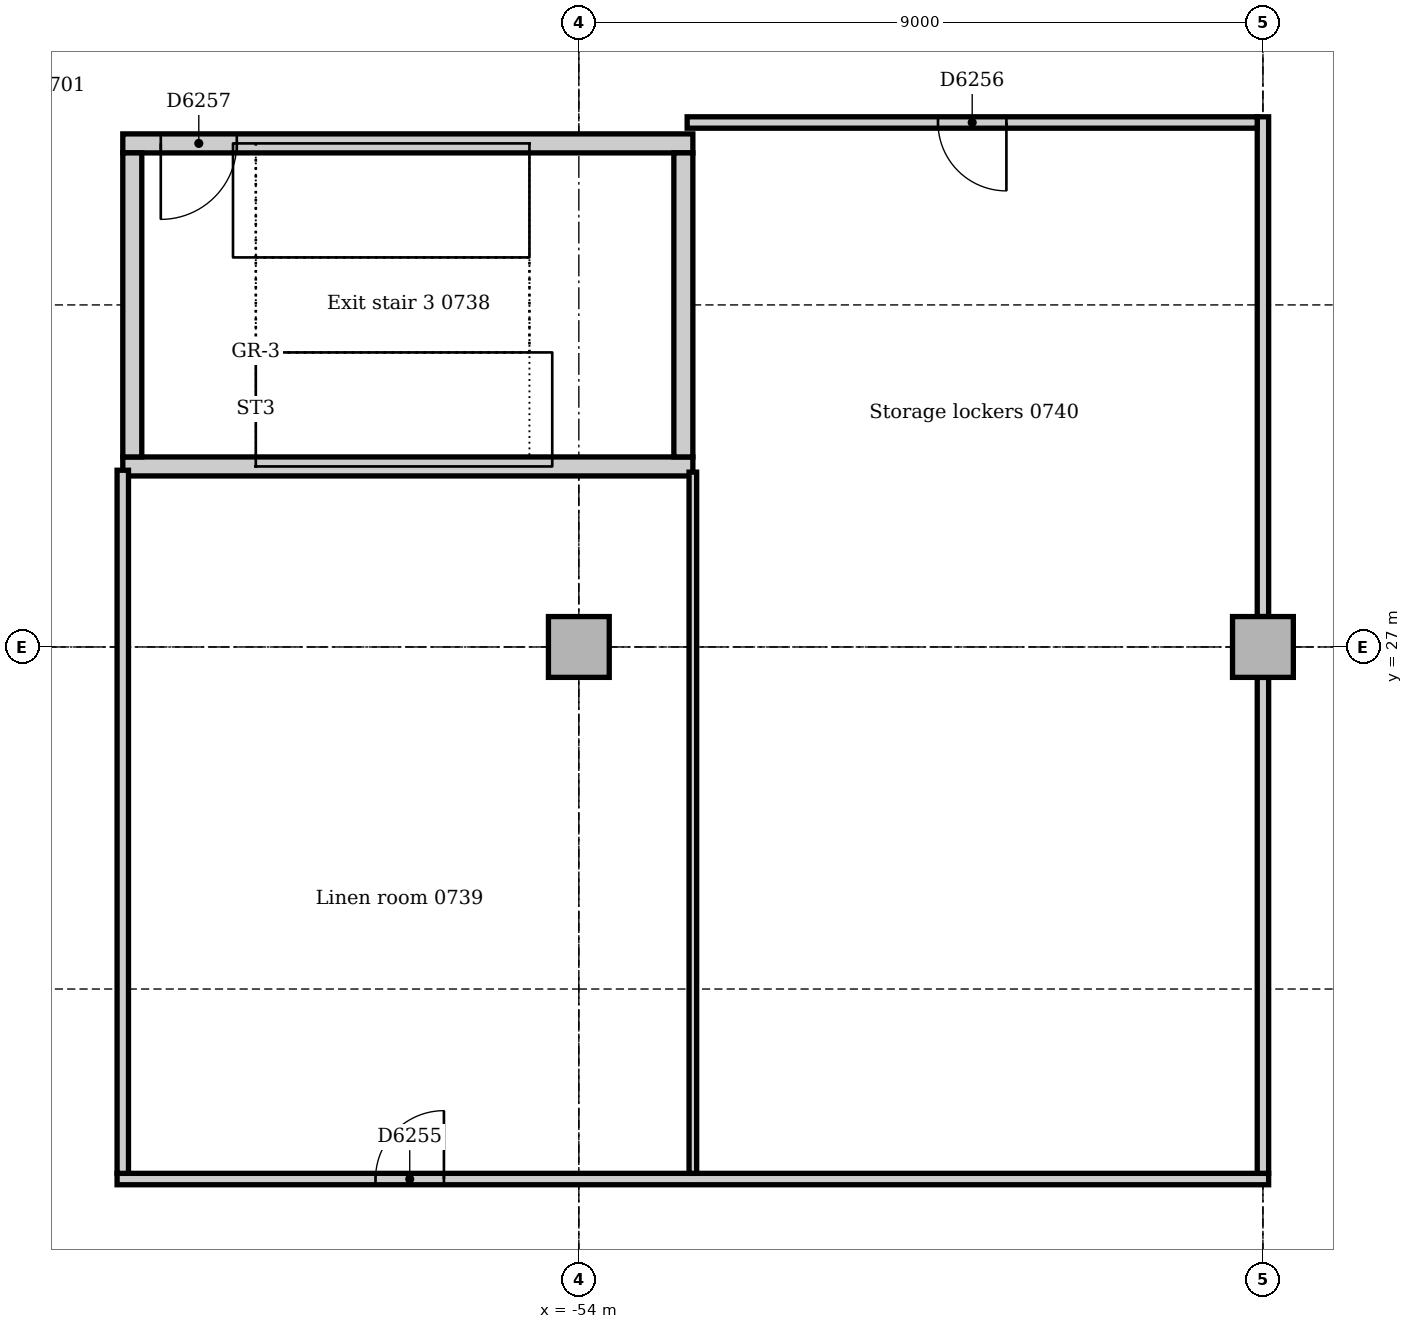
"""IFC4 building model, lengths in metres.
Left out: names, types, materials, properties, quantities, classifications, styles, units other than length and angle.
Written with IfcOpenShell. Run it as: python <this file> out.ifc"""

import sys

from ifc_helpers import new_model, si_unit, direction, frame, frame_2d, origin, origin_2d, place, context, subcontext, project, spatial, rectangle, extrude, element, fill, save


model = new_model("IFC4")
c1 = context("Model", 3, precision=1e-05, world=origin(), true_north=direction((0.0, 1.0)))
c2 = subcontext(c1, "Body", "Model", "MODEL_VIEW")
j1 = project(units=[si_unit("LENGTHUNIT", "METRE"), si_unit("PLANEANGLEUNIT", "RADIAN")], contexts=[c1])
p1 = place(None, origin())
s1 = spatial("IfcSite", under=j1, at=p1, CompositionType="ELEMENT")
p2 = place(p1, origin())
s2 = spatial("IfcBuilding", under=s1, at=p2, CompositionType="ELEMENT")
p3 = place(p2, frame((0.0, 0.0, 34.0)))
s3 = spatial("IfcBuildingStorey", under=s2, at=p3, CompositionType="ELEMENT", Elevation=34.0)
p4 = place(p3, frame((-60.0, 29.375, 0.0), z_axis=(0.0, 0.0, 1.0), x_axis=(1.0, 0.0, 0.0)))
e1 = element("IfcWall", 1, at=p4, inside=s3, PredefinedType="SOLIDWALL", context=c2, shape_type="SweptSolid", body=[
    extrude(rectangle(XDim=7.5, YDim=0.25, at=frame_2d((3.75, 0.0))), origin(), (0.0, 0.0, 1.0), 4.0),
])
p5 = place(p3, frame((-52.5, 33.625, 0.0), z_axis=(0.0, 0.0, 1.0), x_axis=(-1.0, 0.0, 0.0)))
e2 = element("IfcWall", 2, at=p5, inside=s3, PredefinedType="SOLIDWALL", context=c2, shape_type="SweptSolid", body=[
    extrude(rectangle(XDim=7.5, YDim=0.25, at=frame_2d((3.75, 0.0))), origin(), (0.0, 0.0, 1.0), 4.0),
])
p6 = place(p5, frame((6.0, 0.0, 0.0)))
e3 = element("IfcOpeningElement", 3, at=p6, cuts=e2, PredefinedType="OPENING", context=c2, shape_type="SweptSolid", body=[
    extrude(rectangle(XDim=1.0, YDim=2.1, at=frame_2d((0.5, 1.05))), frame((0.0, 0.135, 0.0), z_axis=(0.0, -1.0, 0.0), x_axis=(1.0, 0.0, 0.0)), (0.0, 0.0, 1.0), 0.27),
])
for number, where, z_axis, x_axis in (
    (4, (-52.625, 29.5, 0.0), (0.0, 0.0, 1.0), (0.0, 1.0, 0.0)),
    (5, (-59.875, 33.5, 0.0), (0.0, 0.0, 1.0), (0.0, -1.0, 0.0)),
):
    element("IfcWall", number, at=place(p3, frame(where, z_axis=z_axis, x_axis=x_axis)), inside=s3, PredefinedType="SOLIDWALL", context=c2, shape_type="SweptSolid", body=[
        extrude(rectangle(XDim=4.0, YDim=0.25, at=frame_2d((2.0, 0.0))), origin(), (0.0, 0.0, 1.0), 4.0),
    ])
for number, where, z_axis, x_axis in (
    (6, (-54.0, 27.0, 0.0), (0.0, 0.0, 1.0), (1.0, 0.0, 0.0)),
    (7, (-45.0, 27.0, 0.0), (0.0, 0.0, 1.0), (1.0, 0.0, 0.0)),
):
    element("IfcColumn", number, at=place(p3, frame(where, z_axis=z_axis, x_axis=x_axis)), inside=s3, PredefinedType="COLUMN", context=c2, shape_type="SweptSolid", body=[
        extrude(rectangle(XDim=0.8, YDim=0.8, at=origin_2d()), origin(), (0.0, 0.0, 1.0), 3.85),
    ])
p7 = place(p3, frame((-60.075, 20.0, 0.0), z_axis=(0.0, 0.0, 1.0), x_axis=(1.0, 0.0, 0.0)))
e8 = element("IfcWall", 8, at=p7, inside=s3, PredefinedType="PARTITIONING", context=c2, shape_type="SweptSolid", body=[
    extrude(rectangle(XDim=15.15, YDim=0.15, at=frame_2d((7.575, 0.0))), origin(), (0.0, 0.0, 1.0), 3.85),
])
p8 = place(p7, frame((3.4, 0.0, 0.0)))
e9 = element("IfcOpeningElement", 9, at=p8, cuts=e8, PredefinedType="OPENING", context=c2, shape_type="SweptSolid", body=[
    extrude(rectangle(XDim=0.9, YDim=2.1, at=frame_2d((0.45, 1.05))), frame((0.0, 0.085, 0.0), z_axis=(0.0, -1.0, 0.0), x_axis=(1.0, 0.0, 0.0)), (0.0, 0.0, 1.0), 0.17),
])
p9 = place(p3, frame((-45.0, 20.075, 0.0), z_axis=(0.0, 0.0, 1.0), x_axis=(0.0, 1.0, 0.0)))
e10 = element("IfcWall", 10, at=p9, inside=s3, PredefinedType="PARTITIONING", context=c2, shape_type="SweptSolid", body=[
    extrude(rectangle(XDim=6.525, YDim=0.15, at=frame_2d((3.263, 0.0))), origin(), (0.0, 0.0, 1.0), 3.158),
])
p10 = place(p3, frame((-45.0, 27.4, 0.0), z_axis=(0.0, 0.0, 1.0), x_axis=(0.0, 1.0, 0.0)))
e11 = element("IfcWall", 11, at=p10, inside=s3, PredefinedType="PARTITIONING", context=c2, shape_type="SweptSolid", body=[
    extrude(rectangle(XDim=6.575, YDim=0.15, at=frame_2d((3.288, 0.0))), origin(), (0.0, 0.0, 1.0), 3.158),
])
p11 = place(p3, frame((-60.0, 20.075, 0.0), z_axis=(0.0, 0.0, 1.0), x_axis=(0.0, 1.0, 0.0)))
e12 = element("IfcWall", 12, at=p11, inside=s3, PredefinedType="PARTITIONING", context=c2, shape_type="SweptSolid", body=[
    extrude(rectangle(XDim=9.25, YDim=0.15, at=frame_2d((4.625, 0.0))), origin(), (0.0, 0.0, 1.0), 3.85),
])
p12 = place(p3, frame((-52.575, 33.9, 0.0), z_axis=(0.0, 0.0, 1.0), x_axis=(1.0, 0.0, 0.0)))
e13 = element("IfcWall", 13, at=p12, inside=s3, PredefinedType="PARTITIONING", context=c2, shape_type="SweptSolid", body=[
    extrude(rectangle(XDim=7.5, YDim=0.15, at=frame_2d((3.75, 0.0))), origin(), (0.0, 0.0, 1.0), 3.85),
])
p13 = place(p12, frame((3.3, 0.0, 0.0)))
e14 = element("IfcOpeningElement", 14, at=p13, cuts=e13, PredefinedType="OPENING", context=c2, shape_type="SweptSolid", body=[
    extrude(rectangle(XDim=0.9, YDim=2.1, at=frame_2d((0.45, 1.05))), frame((0.0, 0.085, 0.0), z_axis=(0.0, -1.0, 0.0), x_axis=(1.0, 0.0, 0.0)), (0.0, 0.0, 1.0), 0.17),
])
p14 = place(p3, frame((-52.5, 20.075, 0.0), z_axis=(0.0, 0.0, 1.0), x_axis=(0.0, 1.0, 0.0)))
e15 = element("IfcWall", 15, at=p14, inside=s3, PredefinedType="PARTITIONING", context=c2, shape_type="SweptSolid", body=[
    extrude(rectangle(XDim=9.225, YDim=0.1, at=frame_2d((4.612, 0.0))), origin(), (0.0, 0.0, 1.0), 3.85),
])
p15 = place(p8, origin())
e16 = element("IfcDoor", 16, at=p15, inside=s3, OperationType="SINGLE_SWING_RIGHT", PredefinedType="DOOR", context=c2, shape_type="SweptSolid", body=[
    extrude(rectangle(XDim=0.9, YDim=2.1, at=frame_2d((0.45, 1.05))), frame((0.0, 0.025, 0.0), z_axis=(0.0, -1.0, 0.0), x_axis=(1.0, 0.0, 0.0)), (0.0, 0.0, 1.0), 0.05),
])
fill(e9, e16)
p16 = place(p13, frame((0.9, 0.0, 0.0), z_axis=(0.0, 0.0, 1.0), x_axis=(-1.0, 0.0, 0.0)))
e17 = element("IfcDoor", 17, at=p16, inside=s3, OperationType="SINGLE_SWING_LEFT", PredefinedType="DOOR", context=c2, shape_type="SweptSolid", body=[
    extrude(rectangle(XDim=0.9, YDim=2.1, at=frame_2d((0.45, 1.05))), frame((0.0, 0.025, 0.0), z_axis=(0.0, -1.0, 0.0), x_axis=(1.0, 0.0, 0.0)), (0.0, 0.0, 1.0), 0.05),
])
fill(e14, e17)
p17 = place(p6, origin())
e18 = element("IfcDoor", 18, at=p17, inside=s3, OperationType="SINGLE_SWING_RIGHT", PredefinedType="DOOR", context=c2, shape_type="SweptSolid", body=[
    extrude(rectangle(XDim=1.0, YDim=2.1, at=frame_2d((0.5, 1.05))), frame((0.0, 0.025, 0.0), z_axis=(0.0, -1.0, 0.0), x_axis=(1.0, 0.0, 0.0)), (0.0, 0.0, 1.0), 0.05),
])
fill(e3, e18)
save(model, sys.argv[1])
